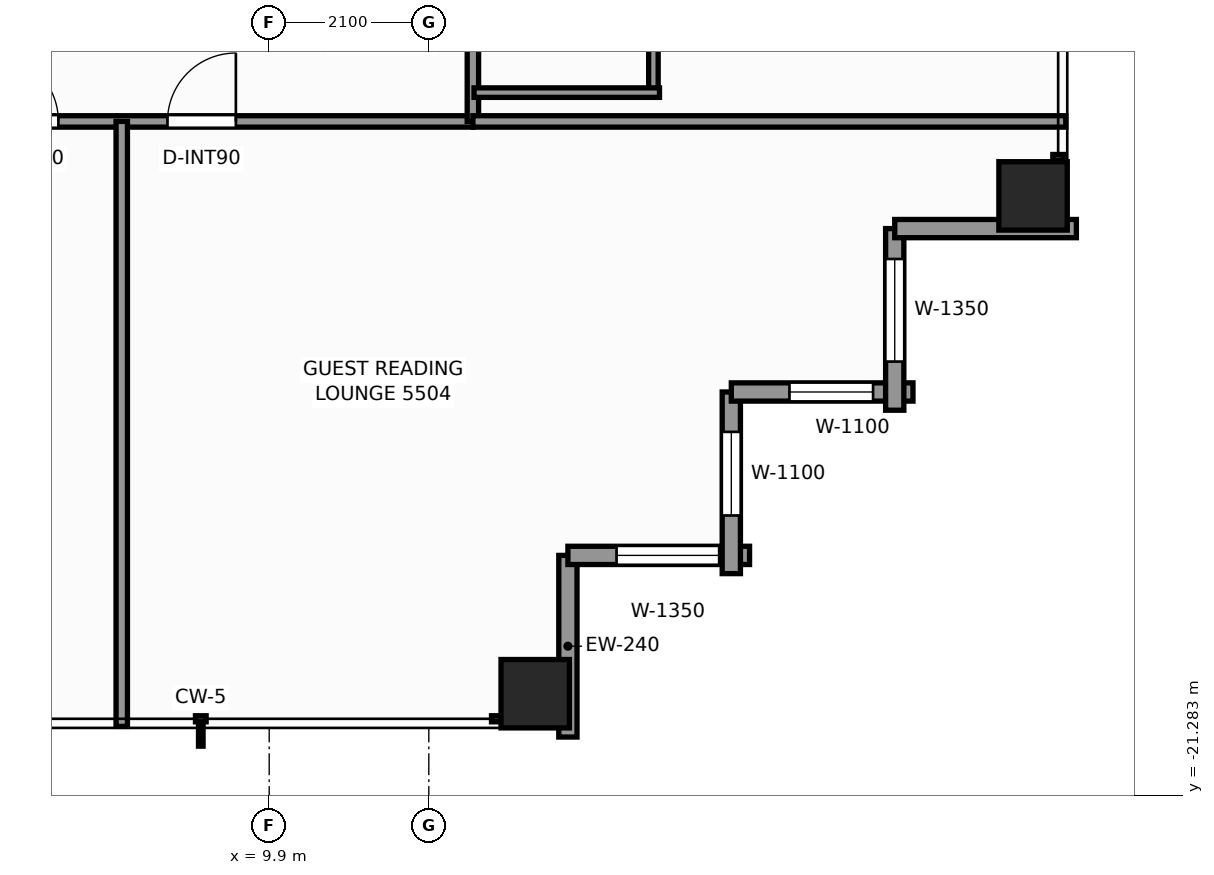
"""IFC4 building model, lengths in metres.
Left out: names, types, materials, properties, quantities, classifications, styles, units other than length and angle.
Written with IfcOpenShell. Run it as: python <this file> out.ifc"""

import sys

from ifc_helpers import new_model, si_unit, direction, frame, frame_2d, origin, origin_2d, place, context, subcontext, project, spatial, rectangle, extrude, element, fill, save


model = new_model("IFC4")
c1 = context("Model", 3, precision=1e-05, world=origin(), true_north=direction((0.0, 1.0)))
c2 = subcontext(c1, "Body", "Model", "MODEL_VIEW")
j1 = project(units=[si_unit("LENGTHUNIT", "METRE"), si_unit("PLANEANGLEUNIT", "RADIAN")], contexts=[c1])
p1 = place(None, origin())
s1 = spatial("IfcSite", under=j1, at=p1, CompositionType="ELEMENT")
p2 = place(p1, origin())
s2 = spatial("IfcBuilding", under=s1, at=p2, CompositionType="ELEMENT")
p3 = place(p2, frame((0.0, 0.0, 189.9)))
s3 = spatial("IfcBuildingStorey", under=s2, at=p3, CompositionType="ELEMENT", Elevation=189.9)
for number, where, z_axis, x_axis in (
    (1, (13.4, -19.95, 0.0), (0.0, 0.0, 1.0), (1.0, 0.0, 0.0)),
    (2, (19.95, -13.4, 0.0), (0.0, 0.0, 1.0), (1.0, 0.0, 0.0)),
):
    element("IfcColumn", number, at=place(p3, frame(where, z_axis=z_axis, x_axis=x_axis)), inside=s3, PredefinedType="COLUMN", context=c2, shape_type="SweptSolid", body=[
        extrude(rectangle(XDim=0.9, YDim=0.9, at=origin_2d()), origin(), (0.0, 0.0, 1.0), 3.3),
    ])
p4 = place(p3, frame((13.83, -18.13, 0.0), z_axis=(0.0, 0.0, 1.0), x_axis=(0.0, -1.0, 0.0)))
e3 = element("IfcWall", 3, at=p4, inside=s3, PredefinedType="STANDARD", context=c2, shape_type="SweptSolid", body=[
    extrude(rectangle(XDim=2.39, YDim=0.24, at=frame_2d((1.195, 0.0))), origin(), (0.0, 0.0, 1.0), 2.463),
])
p5 = place(p3, frame((16.22, -18.13, 0.0), z_axis=(0.0, 0.0, 1.0), x_axis=(-1.0, 0.0, 0.0)))
e4 = element("IfcWall", 4, at=p5, inside=s3, PredefinedType="STANDARD", context=c2, shape_type="SweptSolid", body=[
    extrude(rectangle(XDim=2.39, YDim=0.24, at=frame_2d((1.195, 0.0))), origin(), (0.0, 0.0, 1.0), 2.463),
])
p6 = place(p5, frame((0.4, 0.0, 0.65)))
e5 = element("IfcOpeningElement", 5, at=p6, cuts=e4, PredefinedType="OPENING", context=c2, shape_type="SweptSolid", body=[
    extrude(rectangle(XDim=1.35, YDim=1.55, at=frame_2d((0.675, 0.775))), frame((0.0, 0.13, 0.0), z_axis=(0.0, -1.0, 0.0), x_axis=(1.0, 0.0, 0.0)), (0.0, 0.0, 1.0), 0.26),
])
p7 = place(p3, frame((15.98, -15.98, 0.0), z_axis=(0.0, 0.0, 1.0), x_axis=(0.0, -1.0, 0.0)))
e6 = element("IfcWall", 6, at=p7, inside=s3, PredefinedType="STANDARD", context=c2, shape_type="SweptSolid", body=[
    extrude(rectangle(XDim=2.39, YDim=0.24, at=frame_2d((1.195, 0.0))), origin(), (0.0, 0.0, 1.0), 2.463),
])
p8 = place(p7, frame((0.525, 0.0, 0.65)))
e7 = element("IfcOpeningElement", 7, at=p8, cuts=e6, PredefinedType="OPENING", context=c2, shape_type="SweptSolid", body=[
    extrude(rectangle(XDim=1.1, YDim=1.45, at=frame_2d((0.55, 0.725))), frame((0.0, 0.13, 0.0), z_axis=(0.0, -1.0, 0.0), x_axis=(1.0, 0.0, 0.0)), (0.0, 0.0, 1.0), 0.26),
])
p9 = place(p3, frame((18.37, -15.98, 0.0), z_axis=(0.0, 0.0, 1.0), x_axis=(-1.0, 0.0, 0.0)))
e8 = element("IfcWall", 8, at=p9, inside=s3, PredefinedType="STANDARD", context=c2, shape_type="SweptSolid", body=[
    extrude(rectangle(XDim=2.39, YDim=0.24, at=frame_2d((1.195, 0.0))), origin(), (0.0, 0.0, 1.0), 2.463),
])
p10 = place(p9, frame((0.525, 0.0, 0.65)))
e9 = element("IfcOpeningElement", 9, at=p10, cuts=e8, PredefinedType="OPENING", context=c2, shape_type="SweptSolid", body=[
    extrude(rectangle(XDim=1.1, YDim=1.45, at=frame_2d((0.55, 0.725))), frame((0.0, 0.13, 0.0), z_axis=(0.0, -1.0, 0.0), x_axis=(1.0, 0.0, 0.0)), (0.0, 0.0, 1.0), 0.26),
])
p11 = place(p3, frame((18.13, -13.83, 0.0), z_axis=(0.0, 0.0, 1.0), x_axis=(0.0, -1.0, 0.0)))
e10 = element("IfcWall", 10, at=p11, inside=s3, PredefinedType="STANDARD", context=c2, shape_type="SweptSolid", body=[
    extrude(rectangle(XDim=2.39, YDim=0.24, at=frame_2d((1.195, 0.0))), origin(), (0.0, 0.0, 1.0), 2.463),
])
p12 = place(p11, frame((0.4, 0.0, 0.65)))
e11 = element("IfcOpeningElement", 11, at=p12, cuts=e10, PredefinedType="OPENING", context=c2, shape_type="SweptSolid", body=[
    extrude(rectangle(XDim=1.35, YDim=1.55, at=frame_2d((0.675, 0.775))), frame((0.0, 0.13, 0.0), z_axis=(0.0, -1.0, 0.0), x_axis=(1.0, 0.0, 0.0)), (0.0, 0.0, 1.0), 0.26),
])
p13 = place(p3, frame((20.52, -13.83, 0.0), z_axis=(0.0, 0.0, 1.0), x_axis=(-1.0, 0.0, 0.0)))
e12 = element("IfcWall", 12, at=p13, inside=s3, PredefinedType="STANDARD", context=c2, shape_type="SweptSolid", body=[
    extrude(rectangle(XDim=2.39, YDim=0.24, at=frame_2d((1.195, 0.0))), origin(), (0.0, 0.0, 1.0), 2.463),
])
p14 = place(p3, frame((-12.42, -12.42, 0.0), z_axis=(0.0, 0.0, 1.0), x_axis=(1.0, 0.0, 0.0)))
e13 = element("IfcWall", 13, at=p14, inside=s3, PredefinedType="PARTITIONING", context=c2, shape_type="SweptSolid", body=[
    extrude(rectangle(XDim=25.0, YDim=0.15, at=frame_2d((12.5, 0.0))), origin(), (0.0, 0.0, 1.0), 2.369),
])
p15 = place(p14, frame((1.633, 0.0, 0.0)))
e14 = element("IfcOpeningElement", 14, at=p15, cuts=e13, PredefinedType="OPENING", context=c2, shape_type="SweptSolid", body=[
    extrude(rectangle(XDim=0.9, YDim=2.06, at=frame_2d((0.45, 1.03))), frame((0.0, 0.085, 0.0), z_axis=(0.0, -1.0, 0.0), x_axis=(1.0, 0.0, 0.0)), (0.0, 0.0, 1.0), 0.17),
])
p16 = place(p14, frame((5.113, 0.0, 0.0)))
e15 = element("IfcOpeningElement", 15, at=p16, cuts=e13, PredefinedType="OPENING", context=c2, shape_type="SweptSolid", body=[
    extrude(rectangle(XDim=0.9, YDim=2.06, at=frame_2d((0.45, 1.03))), frame((0.0, 0.085, 0.0), z_axis=(0.0, -1.0, 0.0), x_axis=(1.0, 0.0, 0.0)), (0.0, 0.0, 1.0), 0.17),
])
p17 = place(p14, frame((8.892, 0.0, 0.0)))
e16 = element("IfcOpeningElement", 16, at=p17, cuts=e13, PredefinedType="OPENING", context=c2, shape_type="SweptSolid", body=[
    extrude(rectangle(XDim=0.9, YDim=2.06, at=frame_2d((0.45, 1.03))), frame((0.0, 0.085, 0.0), z_axis=(0.0, -1.0, 0.0), x_axis=(1.0, 0.0, 0.0)), (0.0, 0.0, 1.0), 0.17),
])
p18 = place(p14, frame((13.097, 0.0, 0.0)))
e17 = element("IfcOpeningElement", 17, at=p18, cuts=e13, PredefinedType="OPENING", context=c2, shape_type="SweptSolid", body=[
    extrude(rectangle(XDim=0.95, YDim=2.06, at=frame_2d((0.475, 1.03))), frame((0.0, 0.085, 0.0), z_axis=(0.0, -1.0, 0.0), x_axis=(1.0, 0.0, 0.0)), (0.0, 0.0, 1.0), 0.17),
])
p19 = place(p14, frame((18.646, 0.0, 0.0)))
e18 = element("IfcOpeningElement", 18, at=p19, cuts=e13, PredefinedType="OPENING", context=c2, shape_type="SweptSolid", body=[
    extrude(rectangle(XDim=0.9, YDim=2.06, at=frame_2d((0.45, 1.03))), frame((0.0, 0.085, 0.0), z_axis=(0.0, -1.0, 0.0), x_axis=(1.0, 0.0, 0.0)), (0.0, 0.0, 1.0), 0.17),
])
p20 = place(p14, frame((20.981, 0.0, 0.0)))
e19 = element("IfcOpeningElement", 19, at=p20, cuts=e13, PredefinedType="OPENING", context=c2, shape_type="SweptSolid", body=[
    extrude(rectangle(XDim=0.9, YDim=2.06, at=frame_2d((0.45, 1.03))), frame((0.0, 0.085, 0.0), z_axis=(0.0, -1.0, 0.0), x_axis=(1.0, 0.0, 0.0)), (0.0, 0.0, 1.0), 0.17),
])
p21 = place(p3, frame((12.58, -12.42, 0.0), z_axis=(0.0, 0.0, 1.0), x_axis=(0.0, 1.0, 0.0)))
e20 = element("IfcWall", 20, at=p21, inside=s3, PredefinedType="PARTITIONING", context=c2, shape_type="SweptSolid", body=[
    extrude(rectangle(XDim=24.84, YDim=0.15, at=frame_2d((12.42, 0.0))), origin(), (0.0, 0.0, 1.0), 2.369),
])
p22 = place(p21, frame((3.581, 0.0, 0.0)))
e21 = element("IfcOpeningElement", 21, at=p22, cuts=e20, PredefinedType="OPENING", context=c2, shape_type="SweptSolid", body=[
    extrude(rectangle(XDim=0.95, YDim=2.06, at=frame_2d((0.475, 1.03))), frame((0.0, 0.085, 0.0), z_axis=(0.0, -1.0, 0.0), x_axis=(1.0, 0.0, 0.0)), (0.0, 0.0, 1.0), 0.17),
])
p23 = place(p21, frame((5.877, 0.0, 0.0)))
e22 = element("IfcOpeningElement", 22, at=p23, cuts=e20, PredefinedType="OPENING", context=c2, shape_type="SweptSolid", body=[
    extrude(rectangle(XDim=0.9, YDim=2.06, at=frame_2d((0.45, 1.03))), frame((0.0, 0.085, 0.0), z_axis=(0.0, -1.0, 0.0), x_axis=(1.0, 0.0, 0.0)), (0.0, 0.0, 1.0), 0.17),
])
p24 = place(p21, frame((13.975, 0.0, 0.0)))
e23 = element("IfcOpeningElement", 23, at=p24, cuts=e20, PredefinedType="OPENING", context=c2, shape_type="SweptSolid", body=[
    extrude(rectangle(XDim=0.95, YDim=2.06, at=frame_2d((0.475, 1.03))), frame((0.0, 0.085, 0.0), z_axis=(0.0, -1.0, 0.0), x_axis=(1.0, 0.0, 0.0)), (0.0, 0.0, 1.0), 0.17),
])
p25 = place(p21, frame((18.581, 0.0, 0.0)))
e24 = element("IfcOpeningElement", 24, at=p25, cuts=e20, PredefinedType="OPENING", context=c2, shape_type="SweptSolid", body=[
    extrude(rectangle(XDim=0.9, YDim=2.06, at=frame_2d((0.45, 1.03))), frame((0.0, 0.085, 0.0), z_axis=(0.0, -1.0, 0.0), x_axis=(1.0, 0.0, 0.0)), (0.0, 0.0, 1.0), 0.17),
])
p26 = place(p21, frame((20.826, 0.0, 0.0)))
e25 = element("IfcOpeningElement", 25, at=p26, cuts=e20, PredefinedType="OPENING", context=c2, shape_type="SweptSolid", body=[
    extrude(rectangle(XDim=0.95, YDim=2.06, at=frame_2d((0.475, 1.03))), frame((0.0, 0.085, 0.0), z_axis=(0.0, -1.0, 0.0), x_axis=(1.0, 0.0, 0.0)), (0.0, 0.0, 1.0), 0.17),
])
p27 = place(p3, frame((12.58, -12.42, 0.0), z_axis=(0.0, 0.0, 1.0), x_axis=(1.0, 0.0, 0.0)))
e26 = element("IfcWall", 26, at=p27, inside=s3, PredefinedType="PARTITIONING", context=c2, shape_type="SweptSolid", body=[
    extrude(rectangle(XDim=7.8, YDim=0.15, at=frame_2d((3.9, 0.0))), origin(), (0.0, 0.0, 1.0), 2.369),
])
p28 = place(p3, frame((7.96, -20.38, 0.0), z_axis=(0.0, 0.0, 1.0), x_axis=(0.0, 1.0, 0.0)))
e27 = element("IfcWall", 27, at=p28, inside=s3, PredefinedType="PARTITIONING", context=c2, shape_type="SweptSolid", body=[
    extrude(rectangle(XDim=7.96, YDim=0.15, at=frame_2d((3.98, 0.0))), origin(), (0.0, 0.0, 1.0), 2.453),
])
p29 = place(p3, frame((14.955, -12.101, 0.0), z_axis=(0.0, 0.0, 1.0), x_axis=(0.0, 1.0, 0.0)))
e28 = element("IfcWall", 28, at=p29, inside=s3, PredefinedType="PARTITIONING", context=c2, shape_type="SweptSolid", body=[
    extrude(rectangle(XDim=2.27, YDim=0.125, at=frame_2d((1.135, 0.0))), origin(), (0.0, 0.0, 1.0), 2.369),
])
p30 = place(p3, frame((12.595, -12.041, 0.0), z_axis=(0.0, 0.0, 1.0), x_axis=(1.0, 0.0, 0.0)))
e29 = element("IfcWall", 29, at=p30, inside=s3, PredefinedType="PARTITIONING", context=c2, shape_type="SweptSolid", body=[
    extrude(rectangle(XDim=2.44, YDim=0.125, at=frame_2d((1.22, 0.0))), origin(), (0.0, 0.0, 1.0), 3.08),
])
p31 = place(p6, origin())
e30 = element("IfcWindow", 30, at=p31, inside=s3, PartitioningType="SINGLE_PANEL", PredefinedType="WINDOW", context=c2, shape_type="SweptSolid", body=[
    extrude(rectangle(XDim=1.35, YDim=1.55, at=frame_2d((0.675, 0.775))), frame((0.0, 0.03, 0.0), z_axis=(0.0, -1.0, 0.0), x_axis=(1.0, 0.0, 0.0)), (0.0, 0.0, 1.0), 0.06),
])
fill(e5, e30)
p32 = place(p8, origin())
e31 = element("IfcWindow", 31, at=p32, inside=s3, PartitioningType="SINGLE_PANEL", PredefinedType="WINDOW", context=c2, shape_type="SweptSolid", body=[
    extrude(rectangle(XDim=1.1, YDim=1.45, at=frame_2d((0.55, 0.725))), frame((0.0, 0.03, 0.0), z_axis=(0.0, -1.0, 0.0), x_axis=(1.0, 0.0, 0.0)), (0.0, 0.0, 1.0), 0.06),
])
fill(e7, e31)
p33 = place(p10, origin())
e32 = element("IfcWindow", 32, at=p33, inside=s3, PartitioningType="SINGLE_PANEL", PredefinedType="WINDOW", context=c2, shape_type="SweptSolid", body=[
    extrude(rectangle(XDim=1.1, YDim=1.45, at=frame_2d((0.55, 0.725))), frame((0.0, 0.03, 0.0), z_axis=(0.0, -1.0, 0.0), x_axis=(1.0, 0.0, 0.0)), (0.0, 0.0, 1.0), 0.06),
])
fill(e9, e32)
p34 = place(p12, origin())
e33 = element("IfcWindow", 33, at=p34, inside=s3, PartitioningType="SINGLE_PANEL", PredefinedType="WINDOW", context=c2, shape_type="SweptSolid", body=[
    extrude(rectangle(XDim=1.35, YDim=1.55, at=frame_2d((0.675, 0.775))), frame((0.0, 0.03, 0.0), z_axis=(0.0, -1.0, 0.0), x_axis=(1.0, 0.0, 0.0)), (0.0, 0.0, 1.0), 0.06),
])
fill(e11, e33)
p35 = place(p19, origin())
e34 = element("IfcDoor", 34, at=p35, inside=s3, OperationType="SINGLE_SWING_LEFT", PredefinedType="DOOR", context=c2, shape_type="SweptSolid", body=[
    extrude(rectangle(XDim=0.9, YDim=2.06, at=frame_2d((0.45, 1.03))), frame((0.0, 0.025, 0.0), z_axis=(0.0, -1.0, 0.0), x_axis=(1.0, 0.0, 0.0)), (0.0, 0.0, 1.0), 0.05),
])
fill(e18, e34)
p36 = place(p20, origin())
e35 = element("IfcDoor", 35, at=p36, inside=s3, OperationType="SINGLE_SWING_RIGHT", PredefinedType="DOOR", context=c2, shape_type="SweptSolid", body=[
    extrude(rectangle(XDim=0.9, YDim=2.06, at=frame_2d((0.45, 1.03))), frame((0.0, 0.025, 0.0), z_axis=(0.0, -1.0, 0.0), x_axis=(1.0, 0.0, 0.0)), (0.0, 0.0, 1.0), 0.05),
])
fill(e19, e35)
save(model, sys.argv[1])
